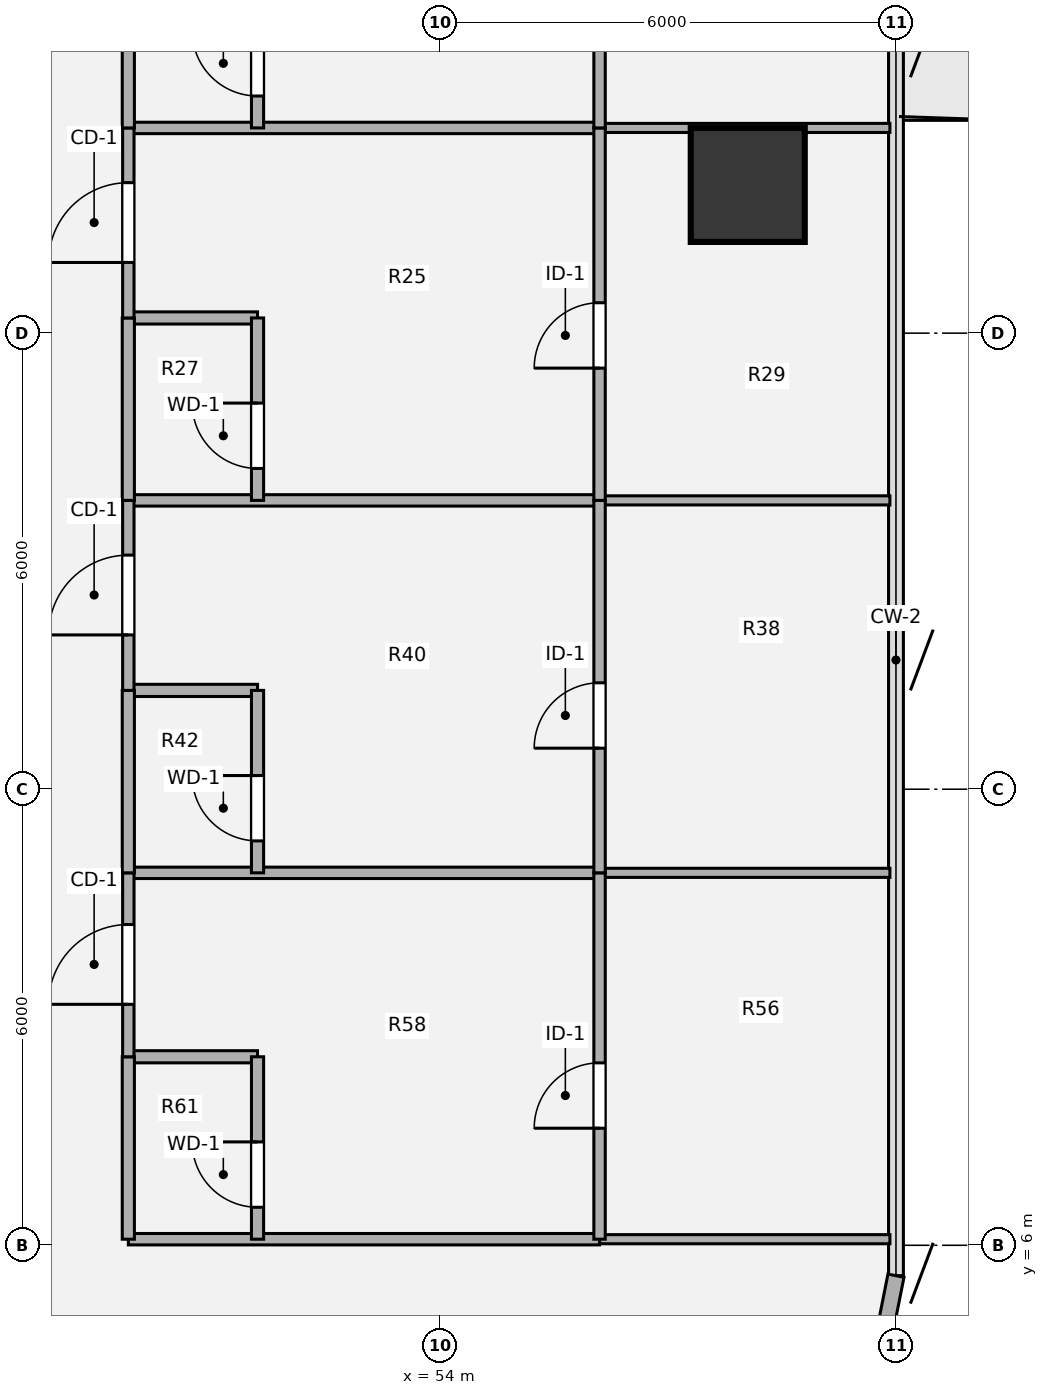
"""IFC4 building model, lengths in metres.
Left out: names, types, materials, properties, quantities, classifications, styles, units other than length and angle.
Written with IfcOpenShell. Run it as: python <this file> out.ifc"""

import sys

from ifc_helpers import new_model, si_unit, direction, frame, frame_2d, origin, origin_2d, place, context, subcontext, project, spatial, rectangle, hollow_circle, extrude, source, transform, mapped, element, fill, save


model = new_model("IFC4")
c1 = context("Model", 3, precision=1e-05, world=origin(), true_north=direction((0.0, 1.0)))
c2 = subcontext(c1, "Body", "Model", "MODEL_VIEW")
j1 = project(units=[si_unit("LENGTHUNIT", "METRE"), si_unit("PLANEANGLEUNIT", "RADIAN")], contexts=[c1])
p1 = place(None, origin())
s1 = spatial("IfcSite", under=j1, at=p1, CompositionType="ELEMENT")
p2 = place(p1, origin())
s2 = spatial("IfcBuilding", under=s1, at=p2, CompositionType="ELEMENT")
p3 = place(p2, frame((0.0, 0.0, 64.8)))
s3 = spatial("IfcBuildingStorey", under=s2, at=p3, CompositionType="ELEMENT", Elevation=64.8)
m1 = source(origin(), c2, "Body", "SweptSolid", [
    extrude(hollow_circle(Radius=0.75, WallThickness=0.05, at=origin_2d()), origin(), (0.0, 0.0, 1.0), 3.78),
])
p4 = place(p3, frame((58.05, 19.95, 0.0), z_axis=(0.0, 0.0, 1.0), x_axis=(1.0, 0.0, 0.0)))
e1 = element("IfcColumn", 1, at=p4, inside=s3, PredefinedType="COLUMN", context=c2, shape_type="MappedRepresentation", body=[
    mapped(m1, transform((0.0, 0.0, 0.0), x_axis=(1.0, 0.0, 0.0), y_axis=(0.0, 1.0, 0.0), z_axis=(0.0, 0.0, 1.0), scale=1.0)),
])
p5 = place(p3, frame((60.0, 5.6, 0.0), z_axis=(0.0, 0.0, 1.0), x_axis=(-0.195138390419, -0.980775717779, 0.0)))
e2 = element("IfcWall", 2, at=p5, inside=s3, PredefinedType="SOLIDWALL", context=c2, shape_type="SweptSolid", body=[
    extrude(rectangle(XDim=1.249, YDim=0.215, at=frame_2d((0.624, 0.0))), origin(), (0.0, 0.0, 1.0), 3.53),
])
p6 = place(p3, frame((49.9, 6.08, 0.0), z_axis=(0.0, 0.0, 1.0), x_axis=(1.0, 0.0, 0.0)))
e3 = element("IfcWall", 3, at=p6, inside=s3, PredefinedType="PARTITIONING", context=c2, shape_type="SweptSolid", body=[
    extrude(rectangle(XDim=6.2, YDim=0.15, at=frame_2d((3.1, 0.0))), origin(), (0.0, 0.0, 1.0), 3.5),
])
p7 = place(p3, frame((56.1, 6.08, 0.0), z_axis=(0.0, 0.0, 1.0), x_axis=(1.0, 0.0, 0.0)))
e4 = element("IfcWall", 4, at=p7, inside=s3, PredefinedType="PARTITIONING", context=c2, shape_type="SweptSolid", body=[
    extrude(rectangle(XDim=3.82, YDim=0.12, at=frame_2d((1.91, 0.0))), origin(), (0.0, 0.0, 1.0), 3.5),
])
p8 = place(p3, frame((49.9, 8.48, 0.0), z_axis=(0.0, 0.0, 1.0), x_axis=(1.0, 0.0, 0.0)))
e5 = element("IfcWall", 5, at=p8, inside=s3, PredefinedType="PLUMBINGWALL", context=c2, shape_type="SweptSolid", body=[
    extrude(rectangle(XDim=1.7, YDim=0.16, at=frame_2d((0.85, 0.0))), origin(), (0.0, 0.0, 1.0), 3.5),
])
p9 = place(p3, frame((49.9, 10.9, 0.0), z_axis=(0.0, 0.0, 1.0), x_axis=(1.0, 0.0, 0.0)))
e6 = element("IfcWall", 6, at=p9, inside=s3, PredefinedType="PARTITIONING", context=c2, shape_type="SweptSolid", body=[
    extrude(rectangle(XDim=6.2, YDim=0.15, at=frame_2d((3.1, 0.0))), origin(), (0.0, 0.0, 1.0), 3.5),
])
p10 = place(p3, frame((56.1, 10.9, 0.0), z_axis=(0.0, 0.0, 1.0), x_axis=(1.0, 0.0, 0.0)))
e7 = element("IfcWall", 7, at=p10, inside=s3, PredefinedType="PARTITIONING", context=c2, shape_type="SweptSolid", body=[
    extrude(rectangle(XDim=3.82, YDim=0.12, at=frame_2d((1.91, 0.0))), origin(), (0.0, 0.0, 1.0), 3.5),
])
p11 = place(p3, frame((49.9, 13.3, 0.0), z_axis=(0.0, 0.0, 1.0), x_axis=(1.0, 0.0, 0.0)))
e8 = element("IfcWall", 8, at=p11, inside=s3, PredefinedType="PLUMBINGWALL", context=c2, shape_type="SweptSolid", body=[
    extrude(rectangle(XDim=1.7, YDim=0.16, at=frame_2d((0.85, 0.0))), origin(), (0.0, 0.0, 1.0), 3.5),
])
p12 = place(p3, frame((49.9, 15.8, 0.0), z_axis=(0.0, 0.0, 1.0), x_axis=(1.0, 0.0, 0.0)))
e9 = element("IfcWall", 9, at=p12, inside=s3, PredefinedType="PARTITIONING", context=c2, shape_type="SweptSolid", body=[
    extrude(rectangle(XDim=6.2, YDim=0.15, at=frame_2d((3.1, 0.0))), origin(), (0.0, 0.0, 1.0), 3.5),
])
p13 = place(p3, frame((56.1, 15.8, 0.0), z_axis=(0.0, 0.0, 1.0), x_axis=(1.0, 0.0, 0.0)))
e10 = element("IfcWall", 10, at=p13, inside=s3, PredefinedType="PARTITIONING", context=c2, shape_type="SweptSolid", body=[
    extrude(rectangle(XDim=3.82, YDim=0.12, at=frame_2d((1.91, 0.0))), origin(), (0.0, 0.0, 1.0), 3.5),
])
p14 = place(p3, frame((49.9, 18.2, 0.0), z_axis=(0.0, 0.0, 1.0), x_axis=(1.0, 0.0, 0.0)))
e11 = element("IfcWall", 11, at=p14, inside=s3, PredefinedType="PLUMBINGWALL", context=c2, shape_type="SweptSolid", body=[
    extrude(rectangle(XDim=1.7, YDim=0.16, at=frame_2d((0.85, 0.0))), origin(), (0.0, 0.0, 1.0), 2.715),
])
p15 = place(p3, frame((49.9, 20.7, 0.0), z_axis=(0.0, 0.0, 1.0), x_axis=(1.0, 0.0, 0.0)))
e12 = element("IfcWall", 12, at=p15, inside=s3, PredefinedType="PARTITIONING", context=c2, shape_type="SweptSolid", body=[
    extrude(rectangle(XDim=6.2, YDim=0.15, at=frame_2d((3.1, 0.0))), origin(), (0.0, 0.0, 1.0), 2.982),
])
p16 = place(p3, frame((56.1, 20.7, 0.0), z_axis=(0.0, 0.0, 1.0), x_axis=(1.0, 0.0, 0.0)))
e13 = element("IfcWall", 13, at=p16, inside=s3, PredefinedType="PARTITIONING", context=c2, shape_type="SweptSolid", body=[
    extrude(rectangle(XDim=3.82, YDim=0.12, at=frame_2d((1.91, 0.0))), origin(), (0.0, 0.0, 1.0), 2.982),
])
p17 = place(p3, frame((49.9, 6.08, 0.0), z_axis=(0.0, 0.0, 1.0), x_axis=(0.0, 1.0, 0.0)))
e14 = element("IfcWall", 14, at=p17, inside=s3, PredefinedType="PLUMBINGWALL", context=c2, shape_type="SweptSolid", body=[
    extrude(rectangle(XDim=2.4, YDim=0.16, at=frame_2d((1.2, 0.0))), origin(), (0.0, 0.0, 1.0), 3.5),
])
p18 = place(p3, frame((49.9, 8.48, 0.0), z_axis=(0.0, 0.0, 1.0), x_axis=(0.0, 1.0, 0.0)))
e15 = element("IfcWall", 15, at=p18, inside=s3, PredefinedType="PARTITIONING", context=c2, shape_type="SweptSolid", body=[
    extrude(rectangle(XDim=2.42, YDim=0.15, at=frame_2d((1.21, 0.0))), origin(), (0.0, 0.0, 1.0), 3.5),
])
p19 = place(p18, frame((0.69, 0.0, 0.0)))
e16 = element("IfcOpeningElement", 16, at=p19, cuts=e15, PredefinedType="OPENING", context=c2, shape_type="SweptSolid", body=[
    extrude(rectangle(XDim=1.05, YDim=2.1, at=origin_2d()), frame((0.525, 0.085, 1.05), z_axis=(0.0, -1.0, 0.0), x_axis=(1.0, 0.0, 0.0)), (0.0, 0.0, 1.0), 0.17),
])
p20 = place(p3, frame((49.9, 10.9, 0.0), z_axis=(0.0, 0.0, 1.0), x_axis=(0.0, 1.0, 0.0)))
e17 = element("IfcWall", 17, at=p20, inside=s3, PredefinedType="PLUMBINGWALL", context=c2, shape_type="SweptSolid", body=[
    extrude(rectangle(XDim=2.4, YDim=0.16, at=frame_2d((1.2, 0.0))), origin(), (0.0, 0.0, 1.0), 3.5),
])
p21 = place(p3, frame((49.9, 13.3, 0.0), z_axis=(0.0, 0.0, 1.0), x_axis=(0.0, 1.0, 0.0)))
e18 = element("IfcWall", 18, at=p21, inside=s3, PredefinedType="PARTITIONING", context=c2, shape_type="SweptSolid", body=[
    extrude(rectangle(XDim=2.5, YDim=0.15, at=frame_2d((1.25, 0.0))), origin(), (0.0, 0.0, 1.0), 3.5),
])
p22 = place(p21, frame((0.73, 0.0, 0.0)))
e19 = element("IfcOpeningElement", 19, at=p22, cuts=e18, PredefinedType="OPENING", context=c2, shape_type="SweptSolid", body=[
    extrude(rectangle(XDim=1.05, YDim=2.1, at=origin_2d()), frame((0.525, 0.085, 1.05), z_axis=(0.0, -1.0, 0.0), x_axis=(1.0, 0.0, 0.0)), (0.0, 0.0, 1.0), 0.17),
])
p23 = place(p3, frame((49.9, 15.8, 0.0), z_axis=(0.0, 0.0, 1.0), x_axis=(0.0, 1.0, 0.0)))
e20 = element("IfcWall", 20, at=p23, inside=s3, PredefinedType="PLUMBINGWALL", context=c2, shape_type="SweptSolid", body=[
    extrude(rectangle(XDim=2.4, YDim=0.16, at=frame_2d((1.2, 0.0))), origin(), (0.0, 0.0, 1.0), 3.5),
])
p24 = place(p3, frame((49.9, 18.2, 0.0), z_axis=(0.0, 0.0, 1.0), x_axis=(0.0, 1.0, 0.0)))
e21 = element("IfcWall", 21, at=p24, inside=s3, PredefinedType="PARTITIONING", context=c2, shape_type="SweptSolid", body=[
    extrude(rectangle(XDim=2.5, YDim=0.15, at=frame_2d((1.25, 0.0))), origin(), (0.0, 0.0, 1.0), 3.5),
])
p25 = place(p24, frame((0.73, 0.0, 0.0)))
e22 = element("IfcOpeningElement", 22, at=p25, cuts=e21, PredefinedType="OPENING", context=c2, shape_type="SweptSolid", body=[
    extrude(rectangle(XDim=1.05, YDim=2.1, at=origin_2d()), frame((0.525, 0.085, 1.05), z_axis=(0.0, -1.0, 0.0), x_axis=(1.0, 0.0, 0.0)), (0.0, 0.0, 1.0), 0.17),
])
p26 = place(p3, frame((49.9, 20.7, 0.0), z_axis=(0.0, 0.0, 1.0), x_axis=(0.0, 1.0, 0.0)))
e23 = element("IfcWall", 23, at=p26, inside=s3, PredefinedType="PLUMBINGWALL", context=c2, shape_type="SweptSolid", body=[
    extrude(rectangle(XDim=2.4, YDim=0.16, at=frame_2d((1.2, 0.0))), origin(), (0.0, 0.0, 1.0), 3.5),
])
p27 = place(p3, frame((51.6, 6.08, 0.0), z_axis=(0.0, 0.0, 1.0), x_axis=(0.0, 1.0, 0.0)))
e24 = element("IfcWall", 24, at=p27, inside=s3, PredefinedType="PLUMBINGWALL", context=c2, shape_type="SweptSolid", body=[
    extrude(rectangle(XDim=2.4, YDim=0.16, at=frame_2d((1.2, 0.0))), origin(), (0.0, 0.0, 1.0), 3.5),
])
p28 = place(p27, frame((0.42, 0.0, 0.0)))
e25 = element("IfcOpeningElement", 25, at=p28, cuts=e24, PredefinedType="OPENING", context=c2, shape_type="SweptSolid", body=[
    extrude(rectangle(XDim=0.86, YDim=2.1, at=origin_2d()), frame((0.43, 0.09, 1.05), z_axis=(0.0, -1.0, 0.0), x_axis=(1.0, 0.0, 0.0)), (0.0, 0.0, 1.0), 0.18),
])
p29 = place(p3, frame((51.6, 10.9, 0.0), z_axis=(0.0, 0.0, 1.0), x_axis=(0.0, 1.0, 0.0)))
e26 = element("IfcWall", 26, at=p29, inside=s3, PredefinedType="PLUMBINGWALL", context=c2, shape_type="SweptSolid", body=[
    extrude(rectangle(XDim=2.4, YDim=0.16, at=frame_2d((1.2, 0.0))), origin(), (0.0, 0.0, 1.0), 3.5),
])
p30 = place(p29, frame((0.42, 0.0, 0.0)))
e27 = element("IfcOpeningElement", 27, at=p30, cuts=e26, PredefinedType="OPENING", context=c2, shape_type="SweptSolid", body=[
    extrude(rectangle(XDim=0.86, YDim=2.1, at=origin_2d()), frame((0.43, 0.09, 1.05), z_axis=(0.0, -1.0, 0.0), x_axis=(1.0, 0.0, 0.0)), (0.0, 0.0, 1.0), 0.18),
])
p31 = place(p3, frame((51.6, 15.8, 0.0), z_axis=(0.0, 0.0, 1.0), x_axis=(0.0, 1.0, 0.0)))
e28 = element("IfcWall", 28, at=p31, inside=s3, PredefinedType="PLUMBINGWALL", context=c2, shape_type="SweptSolid", body=[
    extrude(rectangle(XDim=2.4, YDim=0.16, at=frame_2d((1.2, 0.0))), origin(), (0.0, 0.0, 1.0), 3.5),
])
p32 = place(p31, frame((0.42, 0.0, 0.0)))
e29 = element("IfcOpeningElement", 29, at=p32, cuts=e28, PredefinedType="OPENING", context=c2, shape_type="SweptSolid", body=[
    extrude(rectangle(XDim=0.86, YDim=2.1, at=origin_2d()), frame((0.43, 0.09, 1.05), z_axis=(0.0, -1.0, 0.0), x_axis=(1.0, 0.0, 0.0)), (0.0, 0.0, 1.0), 0.18),
])
p33 = place(p3, frame((51.6, 20.7, 0.0), z_axis=(0.0, 0.0, 1.0), x_axis=(0.0, 1.0, 0.0)))
e30 = element("IfcWall", 30, at=p33, inside=s3, PredefinedType="PLUMBINGWALL", context=c2, shape_type="SweptSolid", body=[
    extrude(rectangle(XDim=2.4, YDim=0.16, at=frame_2d((1.2, 0.0))), origin(), (0.0, 0.0, 1.0), 3.5),
])
p34 = place(p33, frame((0.42, 0.0, 0.0)))
e31 = element("IfcOpeningElement", 31, at=p34, cuts=e30, PredefinedType="OPENING", context=c2, shape_type="SweptSolid", body=[
    extrude(rectangle(XDim=0.86, YDim=2.1, at=origin_2d()), frame((0.43, 0.09, 1.05), z_axis=(0.0, -1.0, 0.0), x_axis=(1.0, 0.0, 0.0)), (0.0, 0.0, 1.0), 0.18),
])
p35 = place(p3, frame((56.1, 6.08, 0.0), z_axis=(0.0, 0.0, 1.0), x_axis=(0.0, 1.0, 0.0)))
e32 = element("IfcWall", 32, at=p35, inside=s3, PredefinedType="PARTITIONING", context=c2, shape_type="SweptSolid", body=[
    extrude(rectangle(XDim=4.82, YDim=0.15, at=frame_2d((2.41, 0.0))), origin(), (0.0, 0.0, 1.0), 3.5),
])
p36 = place(p35, frame((1.46, 0.0, 0.0)))
e33 = element("IfcOpeningElement", 33, at=p36, cuts=e32, PredefinedType="OPENING", context=c2, shape_type="SweptSolid", body=[
    extrude(rectangle(XDim=0.86, YDim=2.1, at=origin_2d()), frame((0.43, 0.085, 1.05), z_axis=(0.0, -1.0, 0.0), x_axis=(1.0, 0.0, 0.0)), (0.0, 0.0, 1.0), 0.17),
])
p37 = place(p3, frame((56.1, 10.9, 0.0), z_axis=(0.0, 0.0, 1.0), x_axis=(0.0, 1.0, 0.0)))
e34 = element("IfcWall", 34, at=p37, inside=s3, PredefinedType="PARTITIONING", context=c2, shape_type="SweptSolid", body=[
    extrude(rectangle(XDim=4.9, YDim=0.15, at=frame_2d((2.45, 0.0))), origin(), (0.0, 0.0, 1.0), 3.5),
])
p38 = place(p37, frame((1.64, 0.0, 0.0)))
e35 = element("IfcOpeningElement", 35, at=p38, cuts=e34, PredefinedType="OPENING", context=c2, shape_type="SweptSolid", body=[
    extrude(rectangle(XDim=0.86, YDim=2.1, at=origin_2d()), frame((0.43, 0.085, 1.05), z_axis=(0.0, -1.0, 0.0), x_axis=(1.0, 0.0, 0.0)), (0.0, 0.0, 1.0), 0.17),
])
p39 = place(p3, frame((56.1, 15.8, 0.0), z_axis=(0.0, 0.0, 1.0), x_axis=(0.0, 1.0, 0.0)))
e36 = element("IfcWall", 36, at=p39, inside=s3, PredefinedType="PARTITIONING", context=c2, shape_type="SweptSolid", body=[
    extrude(rectangle(XDim=4.9, YDim=0.15, at=frame_2d((2.45, 0.0))), origin(), (0.0, 0.0, 1.0), 3.5),
])
p40 = place(p39, frame((1.74, 0.0, 0.0)))
e37 = element("IfcOpeningElement", 37, at=p40, cuts=e36, PredefinedType="OPENING", context=c2, shape_type="SweptSolid", body=[
    extrude(rectangle(XDim=0.86, YDim=2.1, at=origin_2d()), frame((0.43, 0.085, 1.05), z_axis=(0.0, -1.0, 0.0), x_axis=(1.0, 0.0, 0.0)), (0.0, 0.0, 1.0), 0.17),
])
p41 = place(p3, frame((56.1, 20.7, 0.0), z_axis=(0.0, 0.0, 1.0), x_axis=(0.0, 1.0, 0.0)))
e38 = element("IfcWall", 38, at=p41, inside=s3, PredefinedType="PARTITIONING", context=c2, shape_type="SweptSolid", body=[
    extrude(rectangle(XDim=4.9, YDim=0.15, at=frame_2d((2.45, 0.0))), origin(), (0.0, 0.0, 1.0), 3.5),
])
p42 = place(p41, frame((1.84, 0.0, 0.0)))
e39 = element("IfcOpeningElement", 39, at=p42, cuts=e38, PredefinedType="OPENING", context=c2, shape_type="SweptSolid", body=[
    extrude(rectangle(XDim=0.86, YDim=2.1, at=origin_2d()), frame((0.43, 0.085, 1.05), z_axis=(0.0, -1.0, 0.0), x_axis=(1.0, 0.0, 0.0)), (0.0, 0.0, 1.0), 0.17),
])
m2 = source(origin(), c2, "Body", "SweptSolid", [
    extrude(rectangle(XDim=1.05, YDim=2.1, at=origin_2d()), frame((0.525, 0.025, 1.05), z_axis=(0.0, -1.0, 0.0), x_axis=(1.0, 0.0, 0.0)), (0.0, 0.0, 1.0), 0.05),
])
p43 = place(p19, origin())
e40 = element("IfcDoor", 40, at=p43, inside=s3, OperationType="SINGLE_SWING_LEFT", PredefinedType="DOOR", context=c2, shape_type="MappedRepresentation", body=[
    mapped(m2, transform((0.0, 0.0, 0.0), x_axis=(1.0, 0.0, 0.0), y_axis=(0.0, 1.0, 0.0), z_axis=(0.0, 0.0, 1.0), scale=1.0)),
])
fill(e16, e40)
p44 = place(p22, origin())
e41 = element("IfcDoor", 41, at=p44, inside=s3, OperationType="SINGLE_SWING_LEFT", PredefinedType="DOOR", context=c2, shape_type="MappedRepresentation", body=[
    mapped(m2, transform((0.0, 0.0, 0.0), x_axis=(1.0, 0.0, 0.0), y_axis=(0.0, 1.0, 0.0), z_axis=(0.0, 0.0, 1.0), scale=1.0)),
])
fill(e19, e41)
p45 = place(p25, origin())
e42 = element("IfcDoor", 42, at=p45, inside=s3, OperationType="SINGLE_SWING_LEFT", PredefinedType="DOOR", context=c2, shape_type="MappedRepresentation", body=[
    mapped(m2, transform((0.0, 0.0, 0.0), x_axis=(1.0, 0.0, 0.0), y_axis=(0.0, 1.0, 0.0), z_axis=(0.0, 0.0, 1.0), scale=1.0)),
])
fill(e22, e42)
m3 = source(origin(), c2, "Body", "SweptSolid", [
    extrude(rectangle(XDim=0.86, YDim=2.1, at=origin_2d()), frame((0.43, 0.025, 1.05), z_axis=(0.0, -1.0, 0.0), x_axis=(1.0, 0.0, 0.0)), (0.0, 0.0, 1.0), 0.05),
])
p46 = place(p28, origin())
e43 = element("IfcDoor", 43, at=p46, inside=s3, OperationType="SINGLE_SWING_RIGHT", PredefinedType="DOOR", context=c2, shape_type="MappedRepresentation", body=[
    mapped(m3, transform((0.0, 0.0, 0.0), x_axis=(1.0, 0.0, 0.0), y_axis=(0.0, 1.0, 0.0), z_axis=(0.0, 0.0, 1.0), scale=1.0)),
])
fill(e25, e43)
p47 = place(p30, origin())
e44 = element("IfcDoor", 44, at=p47, inside=s3, OperationType="SINGLE_SWING_RIGHT", PredefinedType="DOOR", context=c2, shape_type="MappedRepresentation", body=[
    mapped(m3, transform((0.0, 0.0, 0.0), x_axis=(1.0, 0.0, 0.0), y_axis=(0.0, 1.0, 0.0), z_axis=(0.0, 0.0, 1.0), scale=1.0)),
])
fill(e27, e44)
p48 = place(p32, origin())
e45 = element("IfcDoor", 45, at=p48, inside=s3, OperationType="SINGLE_SWING_RIGHT", PredefinedType="DOOR", context=c2, shape_type="MappedRepresentation", body=[
    mapped(m3, transform((0.0, 0.0, 0.0), x_axis=(1.0, 0.0, 0.0), y_axis=(0.0, 1.0, 0.0), z_axis=(0.0, 0.0, 1.0), scale=1.0)),
])
fill(e29, e45)
p49 = place(p34, origin())
e46 = element("IfcDoor", 46, at=p49, inside=s3, OperationType="SINGLE_SWING_RIGHT", PredefinedType="DOOR", context=c2, shape_type="MappedRepresentation", body=[
    mapped(m3, transform((0.0, 0.0, 0.0), x_axis=(1.0, 0.0, 0.0), y_axis=(0.0, 1.0, 0.0), z_axis=(0.0, 0.0, 1.0), scale=1.0)),
])
fill(e31, e46)
m4 = source(origin(), c2, "Body", "SweptSolid", [
    extrude(rectangle(XDim=0.86, YDim=2.1, at=origin_2d()), frame((0.43, 0.025, 1.05), z_axis=(0.0, -1.0, 0.0), x_axis=(1.0, 0.0, 0.0)), (0.0, 0.0, 1.0), 0.05),
])
p50 = place(p36, origin())
e47 = element("IfcDoor", 47, at=p50, inside=s3, OperationType="SINGLE_SWING_LEFT", PredefinedType="DOOR", context=c2, shape_type="MappedRepresentation", body=[
    mapped(m4, transform((0.0, 0.0, 0.0), x_axis=(1.0, 0.0, 0.0), y_axis=(0.0, 1.0, 0.0), z_axis=(0.0, 0.0, 1.0), scale=1.0)),
])
fill(e33, e47)
p51 = place(p38, origin())
e48 = element("IfcDoor", 48, at=p51, inside=s3, OperationType="SINGLE_SWING_LEFT", PredefinedType="DOOR", context=c2, shape_type="MappedRepresentation", body=[
    mapped(m4, transform((0.0, 0.0, 0.0), x_axis=(1.0, 0.0, 0.0), y_axis=(0.0, 1.0, 0.0), z_axis=(0.0, 0.0, 1.0), scale=1.0)),
])
fill(e35, e48)
p52 = place(p40, origin())
e49 = element("IfcDoor", 49, at=p52, inside=s3, OperationType="SINGLE_SWING_LEFT", PredefinedType="DOOR", context=c2, shape_type="MappedRepresentation", body=[
    mapped(m4, transform((0.0, 0.0, 0.0), x_axis=(1.0, 0.0, 0.0), y_axis=(0.0, 1.0, 0.0), z_axis=(0.0, 0.0, 1.0), scale=1.0)),
])
fill(e37, e49)
save(model, sys.argv[1])
